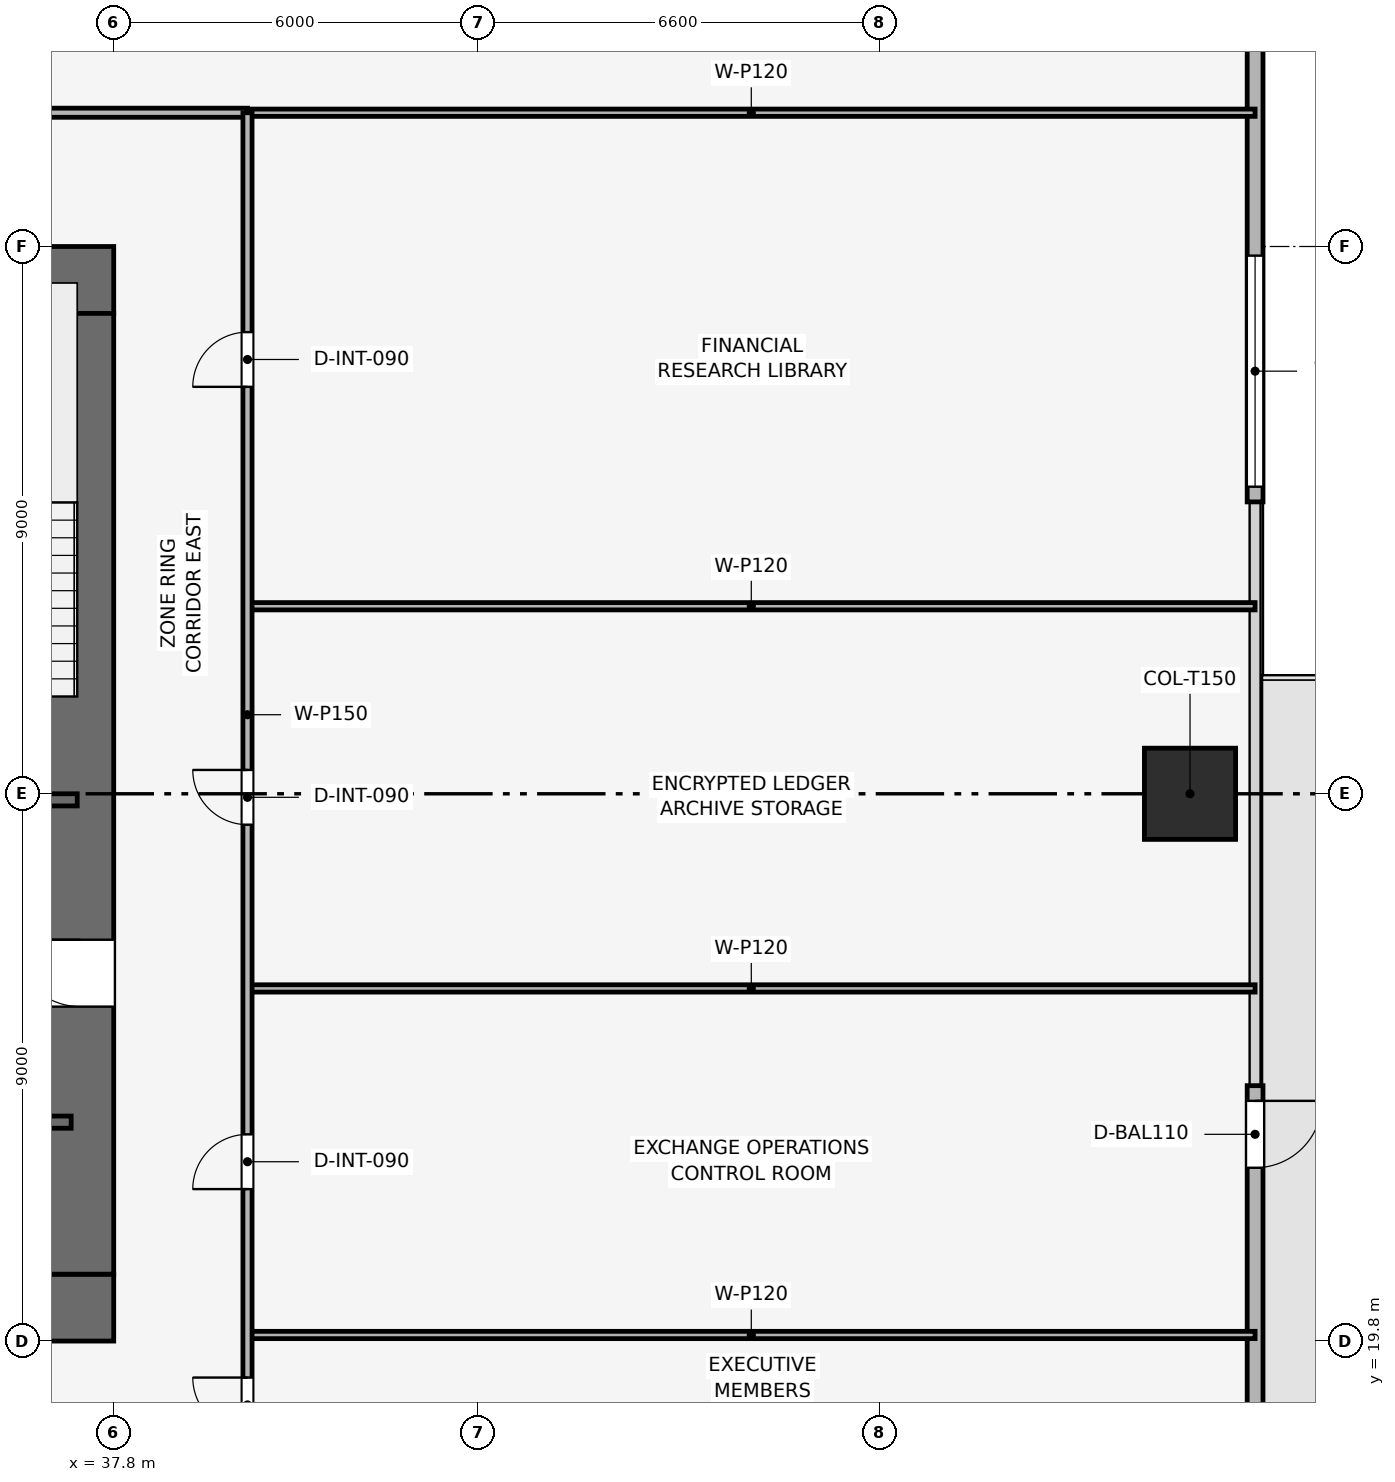
"""IFC4 building model, lengths in metres.
Left out: names, types, materials, properties, quantities, classifications, styles, units other than length and angle.
Written with IfcOpenShell. Run it as: python <this file> out.ifc"""

import sys

from ifc_helpers import new_model, si_unit, direction, frame, frame_2d, origin, origin_2d, place, context, subcontext, project, spatial, rectangle, extrude, element, fill, save


model = new_model("IFC4")
c1 = context("Model", 3, precision=1e-05, world=origin(), true_north=direction((0.0, 1.0)))
c2 = subcontext(c1, "Body", "Model", "MODEL_VIEW")
j1 = project(units=[si_unit("LENGTHUNIT", "METRE"), si_unit("PLANEANGLEUNIT", "RADIAN")], contexts=[c1])
p1 = place(None, origin())
s1 = spatial("IfcSite", under=j1, at=p1, CompositionType="ELEMENT")
p2 = place(p1, origin())
s2 = spatial("IfcBuilding", under=s1, at=p2, CompositionType="ELEMENT")
p3 = place(p2, frame((0.0, 0.0, 65.1)))
s3 = spatial("IfcBuildingStorey", under=s2, at=p3, CompositionType="ELEMENT", Elevation=65.1)
p4 = place(p3, frame((19.8, 20.35, 0.0), z_axis=(0.0, 0.0, 1.0), x_axis=(1.0, 0.0, 0.0)))
e1 = element("IfcWall", 1, at=p4, inside=s3, PredefinedType="SHEAR", context=c2, shape_type="SweptSolid", body=[
    extrude(rectangle(XDim=18.0, YDim=1.1, at=frame_2d((9.0, 0.0))), origin(), (0.0, 0.0, 1.0), 3.9),
])
p5 = place(p4, frame((8.4, 0.0, 0.0)))
e2 = element("IfcOpeningElement", 2, at=p5, cuts=e1, PredefinedType="OPENING", context=c2, shape_type="SweptSolid", body=[
    extrude(rectangle(XDim=1.2, YDim=2.2, at=frame_2d((0.6, 1.1))), frame((0.0, 0.56, 0.0), z_axis=(0.0, -1.0, 0.0), x_axis=(1.0, 0.0, 0.0)), (0.0, 0.0, 1.0), 1.12),
])
p6 = place(p3, frame((19.8, 37.25, 0.0), z_axis=(0.0, 0.0, 1.0), x_axis=(1.0, 0.0, 0.0)))
e3 = element("IfcWall", 3, at=p6, inside=s3, PredefinedType="SHEAR", context=c2, shape_type="SweptSolid", body=[
    extrude(rectangle(XDim=18.0, YDim=1.1, at=frame_2d((9.0, 0.0))), origin(), (0.0, 0.0, 1.0), 3.9),
])
p7 = place(p6, frame((7.05, 0.0, 0.0)))
e4 = element("IfcOpeningElement", 4, at=p7, cuts=e3, PredefinedType="OPENING", context=c2, shape_type="SweptSolid", body=[
    extrude(rectangle(XDim=1.1, YDim=2.15, at=frame_2d((0.55, 1.075))), frame((0.0, 0.56, 0.0), z_axis=(0.0, -1.0, 0.0), x_axis=(1.0, 0.0, 0.0)), (0.0, 0.0, 1.0), 1.12),
])
p8 = place(p3, frame((37.25, 20.9, 0.0), z_axis=(0.0, 0.0, 1.0), x_axis=(0.0, 1.0, 0.0)))
e5 = element("IfcWall", 5, at=p8, inside=s3, PredefinedType="SHEAR", context=c2, shape_type="SweptSolid", body=[
    extrude(rectangle(XDim=15.8, YDim=1.1, at=frame_2d((7.9, 0.0))), origin(), (0.0, 0.0, 1.0), 3.9),
])
p9 = place(p8, frame((4.4, 0.0, 0.0)))
e6 = element("IfcOpeningElement", 6, at=p9, cuts=e5, PredefinedType="OPENING", context=c2, shape_type="SweptSolid", body=[
    extrude(rectangle(XDim=1.1, YDim=2.15, at=frame_2d((0.55, 1.075))), frame((0.0, 0.56, 0.0), z_axis=(0.0, -1.0, 0.0), x_axis=(1.0, 0.0, 0.0)), (0.0, 0.0, 1.0), 1.12),
])
p10 = place(p3, frame((55.5, 28.8, 0.003), z_axis=(0.0, 0.0, 1.0), x_axis=(1.0, 0.0, 0.0)))
e7 = element("IfcColumn", 7, at=p10, inside=s3, PredefinedType="COLUMN", context=c2, shape_type="SweptSolid", body=[
    extrude(rectangle(XDim=1.5, YDim=1.5, at=origin_2d()), origin(), (0.0, 0.0, 1.0), 3.644),
])
p11 = place(p3, frame((56.57, 48.9, 0.0), z_axis=(0.0, 0.0, 1.0), x_axis=(0.0, -1.0, 0.0)))
e8 = element("IfcWall", 8, at=p11, inside=s3, PredefinedType="SOLIDWALL", context=c2, shape_type="SweptSolid", body=[
    extrude(rectangle(XDim=15.3, YDim=0.26, at=frame_2d((7.65, 0.0))), origin(), (0.0, 0.0, 1.0), 3.65),
])
p12 = place(p11, frame((11.25, 0.0, 0.9)))
e9 = element("IfcOpeningElement", 9, at=p12, cuts=e8, PredefinedType="OPENING", context=c2, shape_type="SweptSolid", body=[
    extrude(rectangle(XDim=3.8, YDim=1.9, at=frame_2d((1.9, 0.95))), frame((0.0, 0.14, 0.0), z_axis=(0.0, -1.0, 0.0), x_axis=(1.0, 0.0, 0.0)), (0.0, 0.0, 1.0), 0.28),
])
p13 = place(p3, frame((56.57, 24.0, 0.0), z_axis=(0.0, 0.0, 1.0), x_axis=(0.0, -1.0, 0.0)))
e10 = element("IfcWall", 10, at=p13, inside=s3, PredefinedType="SOLIDWALL", context=c2, shape_type="SweptSolid", body=[
    extrude(rectangle(XDim=15.3, YDim=0.26, at=frame_2d((7.65, 0.0))), origin(), (0.0, 0.0, 1.0), 3.65),
])
p14 = place(p13, frame((0.25, 0.0, 0.0)))
e11 = element("IfcOpeningElement", 11, at=p14, cuts=e10, PredefinedType="OPENING", context=c2, shape_type="SweptSolid", body=[
    extrude(rectangle(XDim=1.1, YDim=2.2, at=frame_2d((0.55, 1.1))), frame((0.0, 0.14, 0.0), z_axis=(0.0, -1.0, 0.0), x_axis=(1.0, 0.0, 0.0)), (0.0, 0.0, 1.0), 0.28),
])
p15 = place(p3, frame((34.05, 28.7, 0.0), z_axis=(0.0, 0.0, 1.0), x_axis=(1.0, 0.0, 0.0)))
e12 = element("IfcWall", 12, at=p15, inside=s3, PredefinedType="SHEAR", context=c2, shape_type="SweptSolid", body=[
    extrude(rectangle(XDim=3.15, YDim=0.2, at=frame_2d((1.575, 0.0))), origin(), (0.0, 0.0, 1.0), 3.65),
])
p16 = place(p15, frame((0.8, 0.0, 0.0)))
e13 = element("IfcOpeningElement", 13, at=p16, cuts=e12, PredefinedType="OPENING", context=c2, shape_type="SweptSolid", body=[
    extrude(rectangle(XDim=1.0, YDim=2.1, at=frame_2d((0.5, 1.05))), frame((0.0, 0.11, 0.0), z_axis=(0.0, -1.0, 0.0), x_axis=(1.0, 0.0, 0.0)), (0.0, 0.0, 1.0), 0.22),
])
p17 = place(p3, frame((34.05, 23.4, 0.0), z_axis=(0.0, 0.0, 1.0), x_axis=(1.0, 0.0, 0.0)))
e14 = element("IfcWall", 14, at=p17, inside=s3, PredefinedType="SHEAR", context=c2, shape_type="SweptSolid", body=[
    extrude(rectangle(XDim=3.05, YDim=0.2, at=frame_2d((1.525, 0.0))), origin(), (0.0, 0.0, 1.0), 3.65),
])
p18 = place(p17, frame((1.2, 0.0, 0.0)))
e15 = element("IfcOpeningElement", 15, at=p18, cuts=e14, PredefinedType="OPENING", context=c2, shape_type="SweptSolid", body=[
    extrude(rectangle(XDim=1.1, YDim=2.15, at=frame_2d((0.55, 1.075))), frame((0.0, 0.11, 0.0), z_axis=(0.0, -1.0, 0.0), x_axis=(1.0, 0.0, 0.0)), (0.0, 0.0, 1.0), 0.22),
])
for number, where, z_axis, x_axis in (
    (16, (40.0, 40.0, 0.0), (0.0, 0.0, 1.0), (1.0, 0.0, 0.0)),
    (17, (40.0, 19.9, 0.0), (0.0, 0.0, 1.0), (1.0, 0.0, 0.0)),
    (18, (40.0, 25.599, 0.0), (0.0, 0.0, 1.0), (1.0, 0.0, 0.0)),
    (19, (40.0, 31.884, 0.0), (0.0, 0.0, 1.0), (1.0, 0.0, 0.0)),
):
    element("IfcWall", number, at=place(p3, frame(where, z_axis=z_axis, x_axis=x_axis)), inside=s3, PredefinedType="PARTITIONING", context=c2, shape_type="SweptSolid", body=[
        extrude(rectangle(XDim=16.57, YDim=0.12, at=frame_2d((8.285, 0.0))), origin(), (0.0, 0.0, 1.0), 2.935),
    ])
p19 = place(p3, frame((17.6, 40.0, 0.0), z_axis=(0.0, 0.0, 1.0), x_axis=(1.0, 0.0, 0.0)))
e20 = element("IfcWall", 20, at=p19, inside=s3, PredefinedType="PARTITIONING", context=c2, shape_type="SweptSolid", body=[
    extrude(rectangle(XDim=22.4, YDim=0.15, at=frame_2d((11.2, 0.0))), origin(), (0.0, 0.0, 1.0), 3.085),
])
p20 = place(p19, frame((10.75, 0.0, 0.0)))
e21 = element("IfcOpeningElement", 21, at=p20, cuts=e20, PredefinedType="OPENING", context=c2, shape_type="SweptSolid", body=[
    extrude(rectangle(XDim=0.9, YDim=2.1, at=frame_2d((0.45, 1.05))), frame((0.0, 0.085, 0.0), z_axis=(0.0, -1.0, 0.0), x_axis=(1.0, 0.0, 0.0)), (0.0, 0.0, 1.0), 0.17),
])
p21 = place(p3, frame((40.0, 17.6, 0.0), z_axis=(0.0, 0.0, 1.0), x_axis=(0.0, 1.0, 0.0)))
e22 = element("IfcWall", 22, at=p21, inside=s3, PredefinedType="PARTITIONING", context=c2, shape_type="SweptSolid", body=[
    extrude(rectangle(XDim=22.4, YDim=0.15, at=frame_2d((11.2, 0.0))), origin(), (0.0, 0.0, 1.0), 3.085),
])
p22 = place(p21, frame((0.7, 0.0, 0.0)))
e23 = element("IfcOpeningElement", 23, at=p22, cuts=e22, PredefinedType="OPENING", context=c2, shape_type="SweptSolid", body=[
    extrude(rectangle(XDim=0.9, YDim=2.1, at=frame_2d((0.45, 1.05))), frame((0.0, 0.085, 0.0), z_axis=(0.0, -1.0, 0.0), x_axis=(1.0, 0.0, 0.0)), (0.0, 0.0, 1.0), 0.17),
])
p23 = place(p21, frame((4.699, 0.0, 0.0)))
e24 = element("IfcOpeningElement", 24, at=p23, cuts=e22, PredefinedType="OPENING", context=c2, shape_type="SweptSolid", body=[
    extrude(rectangle(XDim=0.9, YDim=2.1, at=frame_2d((0.45, 1.05))), frame((0.0, 0.085, 0.0), z_axis=(0.0, -1.0, 0.0), x_axis=(1.0, 0.0, 0.0)), (0.0, 0.0, 1.0), 0.17),
])
p24 = place(p21, frame((10.692, 0.0, 0.0)))
e25 = element("IfcOpeningElement", 25, at=p24, cuts=e22, PredefinedType="OPENING", context=c2, shape_type="SweptSolid", body=[
    extrude(rectangle(XDim=0.9, YDim=2.1, at=frame_2d((0.45, 1.05))), frame((0.0, 0.085, 0.0), z_axis=(0.0, -1.0, 0.0), x_axis=(1.0, 0.0, 0.0)), (0.0, 0.0, 1.0), 0.17),
])
p25 = place(p21, frame((17.892, 0.0, 0.0)))
e26 = element("IfcOpeningElement", 26, at=p25, cuts=e22, PredefinedType="OPENING", context=c2, shape_type="SweptSolid", body=[
    extrude(rectangle(XDim=0.9, YDim=2.1, at=frame_2d((0.45, 1.05))), frame((0.0, 0.085, 0.0), z_axis=(0.0, -1.0, 0.0), x_axis=(1.0, 0.0, 0.0)), (0.0, 0.0, 1.0), 0.17),
])
p26 = place(p14, origin())
e27 = element("IfcDoor", 27, at=p26, inside=s3, OperationType="SINGLE_SWING_LEFT", PredefinedType="DOOR", context=c2, shape_type="SweptSolid", body=[
    extrude(rectangle(XDim=1.1, YDim=2.2, at=frame_2d((0.55, 1.1))), frame((0.0, 0.025, 0.0), z_axis=(0.0, -1.0, 0.0), x_axis=(1.0, 0.0, 0.0)), (0.0, 0.0, 1.0), 0.05),
])
fill(e11, e27)
p27 = place(p12, origin())
e28 = element("IfcWindow", 28, at=p27, inside=s3, PartitioningType="SINGLE_PANEL", PredefinedType="WINDOW", context=c2, shape_type="SweptSolid", body=[
    extrude(rectangle(XDim=3.8, YDim=1.9, at=frame_2d((1.9, 0.95))), frame((0.0, 0.03, 0.0), z_axis=(0.0, -1.0, 0.0), x_axis=(1.0, 0.0, 0.0)), (0.0, 0.0, 1.0), 0.06),
])
fill(e9, e28)
p28 = place(p22, origin())
e29 = element("IfcDoor", 29, at=p28, inside=s3, OperationType="SINGLE_SWING_RIGHT", PredefinedType="DOOR", context=c2, shape_type="SweptSolid", body=[
    extrude(rectangle(XDim=0.9, YDim=2.1, at=frame_2d((0.45, 1.05))), frame((0.0, 0.025, 0.0), z_axis=(0.0, -1.0, 0.0), x_axis=(1.0, 0.0, 0.0)), (0.0, 0.0, 1.0), 0.05),
])
fill(e23, e29)
p29 = place(p23, origin())
e30 = element("IfcDoor", 30, at=p29, inside=s3, OperationType="SINGLE_SWING_LEFT", PredefinedType="DOOR", context=c2, shape_type="SweptSolid", body=[
    extrude(rectangle(XDim=0.9, YDim=2.1, at=frame_2d((0.45, 1.05))), frame((0.0, 0.025, 0.0), z_axis=(0.0, -1.0, 0.0), x_axis=(1.0, 0.0, 0.0)), (0.0, 0.0, 1.0), 0.05),
])
fill(e24, e30)
p30 = place(p24, origin())
e31 = element("IfcDoor", 31, at=p30, inside=s3, OperationType="SINGLE_SWING_RIGHT", PredefinedType="DOOR", context=c2, shape_type="SweptSolid", body=[
    extrude(rectangle(XDim=0.9, YDim=2.1, at=frame_2d((0.45, 1.05))), frame((0.0, 0.025, 0.0), z_axis=(0.0, -1.0, 0.0), x_axis=(1.0, 0.0, 0.0)), (0.0, 0.0, 1.0), 0.05),
])
fill(e25, e31)
p31 = place(p25, origin())
e32 = element("IfcDoor", 32, at=p31, inside=s3, OperationType="SINGLE_SWING_LEFT", PredefinedType="DOOR", context=c2, shape_type="SweptSolid", body=[
    extrude(rectangle(XDim=0.9, YDim=2.1, at=frame_2d((0.45, 1.05))), frame((0.0, 0.025, 0.0), z_axis=(0.0, -1.0, 0.0), x_axis=(1.0, 0.0, 0.0)), (0.0, 0.0, 1.0), 0.05),
])
fill(e26, e32)
p32 = place(p9, origin())
e33 = element("IfcDoor", 33, at=p32, inside=s3, OperationType="SINGLE_SWING_RIGHT", PredefinedType="DOOR", context=c2, shape_type="SweptSolid", body=[
    extrude(rectangle(XDim=1.1, YDim=2.15, at=frame_2d((0.55, 1.075))), frame((0.0, 0.025, 0.0), z_axis=(0.0, -1.0, 0.0), x_axis=(1.0, 0.0, 0.0)), (0.0, 0.0, 1.0), 0.05),
])
fill(e6, e33)
save(model, sys.argv[1])
